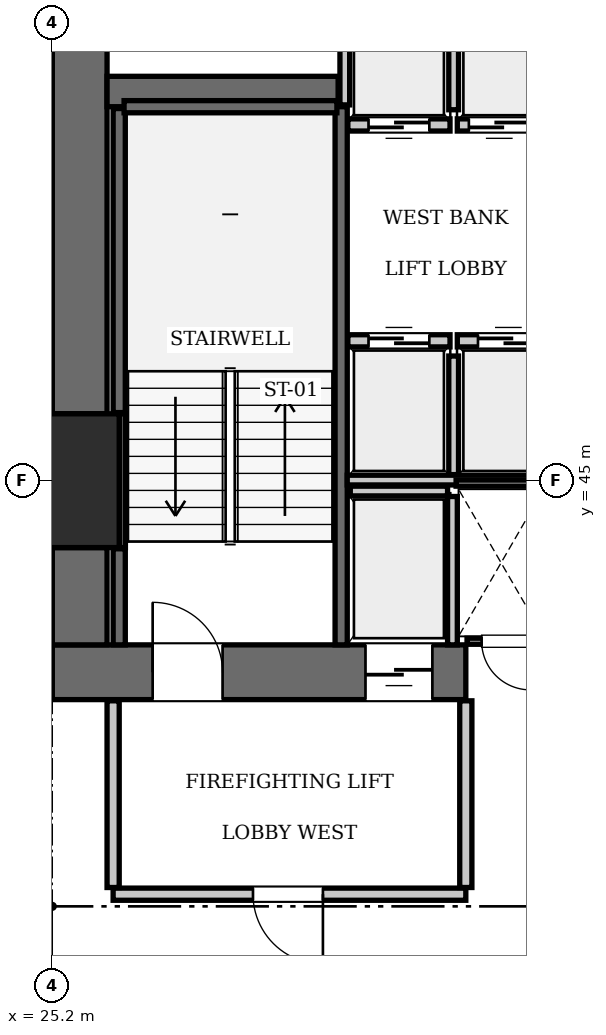
"""IFC4 building model, lengths in metres.
Left out: names, types, materials, properties, quantities, classifications, styles, units other than length and angle.
Written with IfcOpenShell. Run it as: python <this file> out.ifc"""

import sys

from ifc_helpers import new_model, si_unit, direction, frame, frame_2d, origin, origin_2d, place, context, subcontext, project, spatial, rectangle, extrude, element, fill, save


model = new_model("IFC4")
c1 = context("Model", 3, precision=1e-05, world=origin(), true_north=direction((0.0, 1.0)))
c2 = subcontext(c1, "Body", "Model", "MODEL_VIEW")
j1 = project(units=[si_unit("LENGTHUNIT", "METRE"), si_unit("PLANEANGLEUNIT", "RADIAN")], contexts=[c1])
p1 = place(None, origin())
s1 = spatial("IfcSite", under=j1, at=p1, CompositionType="ELEMENT")
p2 = place(p1, origin())
s2 = spatial("IfcBuilding", under=s1, at=p2, CompositionType="ELEMENT")
p3 = place(p2, frame((0.0, 0.0, 100.1)))
s3 = spatial("IfcBuildingStorey", under=s2, at=p3, CompositionType="ELEMENT", Elevation=100.1)
p4 = place(p3, frame((25.2, 45.0, 0.0), z_axis=(0.0, 0.0, 1.0), x_axis=(1.0, 0.0, 0.0)))
e1 = element("IfcColumn", 1, at=p4, inside=s3, PredefinedType="COLUMN", context=c2, shape_type="SweptSolid", body=[
    extrude(rectangle(XDim=2.2, YDim=2.2, at=origin_2d()), origin(), (0.0, 0.0, 1.0), 3.85),
])
p5 = place(p3, frame((25.2, 41.85, 0.0), z_axis=(0.0, 0.0, 1.0), x_axis=(1.0, 0.0, 0.0)))
e2 = element("IfcWall", 2, at=p5, inside=s3, PredefinedType="SHEAR", context=c2, shape_type="SweptSolid", body=[
    extrude(rectangle(XDim=6.8, YDim=0.9, at=frame_2d((3.4, 0.0))), origin(), (0.0, 0.0, 1.0), 3.85),
])
p6 = place(p5, frame((1.65, 0.0, 0.0)))
e3 = element("IfcOpeningElement", 3, at=p6, cuts=e2, PredefinedType="OPENING", context=c2, shape_type="SweptSolid", body=[
    extrude(rectangle(XDim=1.15, YDim=2.15, at=frame_2d((0.575, 1.075))), frame((0.0, 0.46, 0.0), z_axis=(0.0, -1.0, 0.0), x_axis=(1.0, 0.0, 0.0)), (0.0, 0.0, 1.0), 0.92),
])
p7 = place(p5, frame((5.15, 0.0, 0.0)))
e4 = element("IfcOpeningElement", 4, at=p7, cuts=e2, PredefinedType="OPENING", context=c2, shape_type="SweptSolid", body=[
    extrude(rectangle(XDim=1.1, YDim=2.2, at=frame_2d((0.55, 1.1))), frame((0.0, 0.46, 0.0), z_axis=(0.0, -1.0, 0.0), x_axis=(1.0, 0.0, 0.0)), (0.0, 0.0, 1.0), 0.92),
])
p8 = place(p3, frame((25.65, 42.3, 0.0), z_axis=(0.0, 0.0, 1.0), x_axis=(0.0, 1.0, 0.0)))
e5 = element("IfcWall", 5, at=p8, inside=s3, PredefinedType="SHEAR", context=c2, shape_type="SweptSolid", body=[
    extrude(rectangle(XDim=1.6, YDim=0.9, at=frame_2d((0.8, 0.0))), origin(), (0.0, 0.0, 1.0), 3.85),
])
p9 = place(p3, frame((25.65, 46.1, 0.0), z_axis=(0.0, 0.0, 1.0), x_axis=(0.0, 1.0, 0.0)))
e6 = element("IfcWall", 6, at=p9, inside=s3, PredefinedType="SHEAR", context=c2, shape_type="SweptSolid", body=[
    extrude(rectangle(XDim=7.0, YDim=0.9, at=frame_2d((3.5, 0.0))), origin(), (0.0, 0.0, 1.0), 3.85),
])
p10 = place(p3, frame((26.1, 51.4, 0.0), z_axis=(0.0, 0.0, 1.0), x_axis=(1.0, 0.0, 0.0)))
e7 = element("IfcWall", 7, at=p10, inside=s3, PredefinedType="SHEAR", context=c2, shape_type="SweptSolid", body=[
    extrude(rectangle(XDim=3.8, YDim=0.5, at=frame_2d((1.9, 0.0))), origin(), (0.0, 0.0, 1.0), 3.85),
])
p11 = place(p3, frame((29.95, 42.3, 0.0), z_axis=(0.0, 0.0, 1.0), x_axis=(0.0, 1.0, 0.0)))
e8 = element("IfcWall", 8, at=p11, inside=s3, PredefinedType="SOLIDWALL", context=c2, shape_type="SweptSolid", body=[
    extrude(rectangle(XDim=8.85, YDim=0.2, at=frame_2d((4.425, 0.0))), origin(), (0.0, 0.0, 1.0), 3.61),
])
p12 = place(p3, frame((26.3, 42.3, 0.0), z_axis=(0.0, 0.0, 1.0), x_axis=(0.0, 1.0, 0.0)))
e9 = element("IfcWall", 9, at=p12, inside=s3, PredefinedType="SOLIDWALL", context=c2, shape_type="SweptSolid", body=[
    extrude(rectangle(XDim=1.58, YDim=0.2, at=frame_2d((0.79, 0.0))), origin(), (0.0, 0.0, 1.0), 3.61),
])
p13 = place(p3, frame((26.3, 46.12, 0.0), z_axis=(0.0, 0.0, 1.0), x_axis=(0.0, 1.0, 0.0)))
e10 = element("IfcWall", 10, at=p13, inside=s3, PredefinedType="SOLIDWALL", context=c2, shape_type="SweptSolid", body=[
    extrude(rectangle(XDim=5.0, YDim=0.2, at=frame_2d((2.5, 0.0))), origin(), (0.0, 0.0, 1.0), 3.61),
])
p14 = place(p3, frame((26.38, 51.15, 0.0), z_axis=(0.0, 0.0, 1.0), x_axis=(1.0, 0.0, 0.0)))
e11 = element("IfcWall", 11, at=p14, inside=s3, PredefinedType="SOLIDWALL", context=c2, shape_type="SweptSolid", body=[
    extrude(rectangle(XDim=3.5, YDim=0.2, at=frame_2d((1.75, 0.0))), origin(), (0.0, 0.0, 1.0), 3.61),
])
p15 = place(p3, frame((26.352, 43.9, 0.0), z_axis=(0.0, 0.0, 1.0), x_axis=(0.0, 1.0, 0.0)))
e12 = element("IfcWall", 12, at=p15, inside=s3, PredefinedType="SOLIDWALL", context=c2, shape_type="SweptSolid", body=[
    extrude(rectangle(XDim=2.2, YDim=0.1, at=frame_2d((1.1, 0.0))), origin(), (0.0, 0.0, 1.0), 3.61),
])
p16 = place(p3, frame((30.06, 47.3, 0.0), z_axis=(0.0, 0.0, 1.0), x_axis=(1.0, 0.0, 0.0)))
e13 = element("IfcWall", 13, at=p16, inside=s3, PredefinedType="SOLIDWALL", context=c2, shape_type="SweptSolid", body=[
    extrude(rectangle(XDim=1.68, YDim=0.2, at=frame_2d((0.84, 0.0))), origin(), (0.0, 0.0, 1.0), 3.61),
])
p17 = place(p16, frame((0.34, 0.0, 0.0)))
e14 = element("IfcOpeningElement", 14, at=p17, cuts=e13, PredefinedType="OPENING", context=c2, shape_type="SweptSolid", body=[
    extrude(rectangle(XDim=1.0, YDim=2.15, at=frame_2d((0.5, 1.075))), frame((0.0, 0.11, 0.0), z_axis=(0.0, -1.0, 0.0), x_axis=(1.0, 0.0, 0.0)), (0.0, 0.0, 1.0), 0.22),
])
p18 = place(p3, frame((31.86, 47.3, 0.0), z_axis=(0.0, 0.0, 1.0), x_axis=(1.0, 0.0, 0.0)))
e15 = element("IfcWall", 15, at=p18, inside=s3, PredefinedType="SOLIDWALL", context=c2, shape_type="SweptSolid", body=[
    extrude(rectangle(XDim=1.68, YDim=0.2, at=frame_2d((0.84, 0.0))), origin(), (0.0, 0.0, 1.0), 3.61),
])
p19 = place(p18, frame((0.34, 0.0, 0.0)))
e16 = element("IfcOpeningElement", 16, at=p19, cuts=e15, PredefinedType="OPENING", context=c2, shape_type="SweptSolid", body=[
    extrude(rectangle(XDim=1.0, YDim=2.15, at=frame_2d((0.5, 1.075))), frame((0.0, 0.11, 0.0), z_axis=(0.0, -1.0, 0.0), x_axis=(1.0, 0.0, 0.0)), (0.0, 0.0, 1.0), 0.22),
])
p20 = place(p3, frame((30.06, 50.85, 0.0), z_axis=(0.0, 0.0, 1.0), x_axis=(1.0, 0.0, 0.0)))
e17 = element("IfcWall", 17, at=p20, inside=s3, PredefinedType="SOLIDWALL", context=c2, shape_type="SweptSolid", body=[
    extrude(rectangle(XDim=1.68, YDim=0.2, at=frame_2d((0.84, 0.0))), origin(), (0.0, 0.0, 1.0), 3.61),
])
p21 = place(p20, frame((0.34, 0.0, 0.0)))
e18 = element("IfcOpeningElement", 18, at=p21, cuts=e17, PredefinedType="OPENING", context=c2, shape_type="SweptSolid", body=[
    extrude(rectangle(XDim=1.0, YDim=2.15, at=frame_2d((0.5, 1.075))), frame((0.0, 0.11, 0.0), z_axis=(0.0, -1.0, 0.0), x_axis=(1.0, 0.0, 0.0)), (0.0, 0.0, 1.0), 0.22),
])
p22 = place(p3, frame((31.86, 50.85, 0.0), z_axis=(0.0, 0.0, 1.0), x_axis=(1.0, 0.0, 0.0)))
e19 = element("IfcWall", 19, at=p22, inside=s3, PredefinedType="SOLIDWALL", context=c2, shape_type="SweptSolid", body=[
    extrude(rectangle(XDim=1.38, YDim=0.2, at=frame_2d((0.69, 0.0))), origin(), (0.0, 0.0, 1.0), 3.61),
])
p23 = place(p22, frame((0.19, 0.0, 0.0)))
e20 = element("IfcOpeningElement", 20, at=p23, cuts=e19, PredefinedType="OPENING", context=c2, shape_type="SweptSolid", body=[
    extrude(rectangle(XDim=1.0, YDim=2.15, at=frame_2d((0.5, 1.075))), frame((0.0, 0.11, 0.0), z_axis=(0.0, -1.0, 0.0), x_axis=(1.0, 0.0, 0.0)), (0.0, 0.0, 1.0), 0.22),
])
p24 = place(p3, frame((30.1, 44.83, 0.0), z_axis=(0.0, 0.0, 1.0), x_axis=(1.0, 0.0, 0.0)))
e21 = element("IfcWall", 21, at=p24, inside=s3, PredefinedType="SOLIDWALL", context=c2, shape_type="SweptSolid", body=[
    extrude(rectangle(XDim=1.6, YDim=0.16, at=frame_2d((0.8, 0.0))), origin(), (0.0, 0.0, 1.0), 3.61),
])
p25 = place(p3, frame((31.78, 42.3, 0.0), z_axis=(0.0, 0.0, 1.0), x_axis=(0.0, 1.0, 0.0)))
e22 = element("IfcWall", 22, at=p25, inside=s3, PredefinedType="SOLIDWALL", context=c2, shape_type="SweptSolid", body=[
    extrude(rectangle(XDim=2.44, YDim=0.16, at=frame_2d((1.22, 0.0))), origin(), (0.0, 0.0, 1.0), 3.61),
])
p26 = place(p3, frame((31.8, 45.1, 0.0), z_axis=(0.0, 0.0, 1.0), x_axis=(0.0, 1.0, 0.0)))
e23 = element("IfcWall", 23, at=p26, inside=s3, PredefinedType="SOLIDWALL", context=c2, shape_type="SweptSolid", body=[
    extrude(rectangle(XDim=1.95, YDim=0.16, at=frame_2d((0.975, 0.0))), origin(), (0.0, 0.0, 1.0), 3.61),
])
p27 = place(p3, frame((30.05, 45.01, 0.0), z_axis=(0.0, 0.0, 1.0), x_axis=(1.0, 0.0, 0.0)))
e24 = element("IfcWall", 24, at=p27, inside=s3, PredefinedType="SOLIDWALL", context=c2, shape_type="SweptSolid", body=[
    extrude(rectangle(XDim=3.45, YDim=0.16, at=frame_2d((1.725, 0.0))), origin(), (0.0, 0.0, 1.0), 3.61),
])
p28 = place(p3, frame((30.01, 51.18, 0.0), z_axis=(0.0, 0.0, 1.0), x_axis=(0.0, 1.0, 0.0)))
e25 = element("IfcWall", 25, at=p28, inside=s3, PredefinedType="SOLIDWALL", context=c2, shape_type="SweptSolid", body=[
    extrude(rectangle(XDim=1.92, YDim=0.16, at=frame_2d((0.96, 0.0))), origin(), (0.0, 0.0, 1.0), 3.61),
])
p29 = place(p3, frame((31.8, 51.1, 0.0), z_axis=(0.0, 0.0, 1.0), x_axis=(0.0, 1.0, 0.0)))
e26 = element("IfcWall", 26, at=p29, inside=s3, PredefinedType="SOLIDWALL", context=c2, shape_type="SweptSolid", body=[
    extrude(rectangle(XDim=2.0, YDim=0.16, at=frame_2d((1.0, 0.0))), origin(), (0.0, 0.0, 1.0), 3.61),
])
p30 = place(p3, frame((26.2, 38.2, 0.0), z_axis=(0.0, 0.0, 1.0), x_axis=(1.0, 0.0, 0.0)))
e27 = element("IfcWall", 27, at=p30, inside=s3, PredefinedType="PARTITIONING", context=c2, shape_type="SweptSolid", body=[
    extrude(rectangle(XDim=5.8, YDim=0.2, at=frame_2d((2.9, 0.0))), origin(), (0.0, 0.0, 1.0), 3.61),
])
p31 = place(p30, frame((2.3, 0.0, 0.0)))
e28 = element("IfcOpeningElement", 28, at=p31, cuts=e27, PredefinedType="OPENING", context=c2, shape_type="SweptSolid", body=[
    extrude(rectangle(XDim=1.15, YDim=2.15, at=frame_2d((0.575, 1.075))), frame((0.0, 0.11, 0.0), z_axis=(0.0, -1.0, 0.0), x_axis=(1.0, 0.0, 0.0)), (0.0, 0.0, 1.0), 0.22),
])
for number, where, z_axis, x_axis in (
    (29, (26.2, 38.31, 0.0), (0.0, 0.0, 1.0), (0.0, 1.0, 0.0)),
    (30, (32.0, 38.31, 0.0), (0.0, 0.0, 1.0), (0.0, 1.0, 0.0)),
):
    element("IfcWall", number, at=place(p3, frame(where, z_axis=z_axis, x_axis=x_axis)), inside=s3, PredefinedType="PARTITIONING", context=c2, shape_type="SweptSolid", body=[
        extrude(rectangle(XDim=3.07, YDim=0.2, at=frame_2d((1.535, 0.0))), origin(), (0.0, 0.0, 1.0), 3.61),
    ])
p32 = place(p3, frame((32.02, 42.36, 0.0), z_axis=(0.0, 0.0, 1.0), x_axis=(1.0, 0.0, 0.0)))
e31 = element("IfcWall", 31, at=p32, inside=s3, PredefinedType="PARTITIONING", context=c2, shape_type="SweptSolid", body=[
    extrude(rectangle(XDim=1.32, YDim=0.1, at=frame_2d((0.66, 0.0))), origin(), (0.0, 0.0, 1.0), 3.61),
])
p33 = place(p32, frame((0.24, 0.0, 0.0)))
e32 = element("IfcOpeningElement", 32, at=p33, cuts=e31, PredefinedType="OPENING", context=c2, shape_type="SweptSolid", body=[
    extrude(rectangle(XDim=0.8, YDim=2.05, at=frame_2d((0.4, 1.025))), frame((0.0, 0.06, 0.0), z_axis=(0.0, -1.0, 0.0), x_axis=(1.0, 0.0, 0.0)), (0.0, 0.0, 1.0), 0.12),
])
p34 = place(p3, frame((31.84, 44.96, 0.0), z_axis=(0.0, 0.0, 1.0), x_axis=(1.0, 0.0, 0.0)))
e33 = element("IfcWall", 33, at=p34, inside=s3, PredefinedType="PARTITIONING", context=c2, shape_type="SweptSolid", body=[
    extrude(rectangle(XDim=1.48, YDim=0.1, at=frame_2d((0.74, 0.0))), origin(), (0.0, 0.0, 1.0), 3.61),
])
p35 = place(p6, origin())
e34 = element("IfcDoor", 34, at=p35, inside=s3, OperationType="SINGLE_SWING_LEFT", PredefinedType="DOOR", context=c2, shape_type="SweptSolid", body=[
    extrude(rectangle(XDim=1.15, YDim=2.15, at=frame_2d((0.575, 1.075))), frame((0.0, 0.025, 0.0), z_axis=(0.0, -1.0, 0.0), x_axis=(1.0, 0.0, 0.0)), (0.0, 0.0, 1.0), 0.05),
])
fill(e3, e34)
p36 = place(p17, origin())
e35 = element("IfcDoor", 35, at=p36, inside=s3, OperationType="SLIDING_TO_LEFT", PredefinedType="DOOR", context=c2, shape_type="SweptSolid", body=[
    extrude(rectangle(XDim=1.0, YDim=2.15, at=frame_2d((0.5, 1.075))), frame((0.0, 0.025, 0.0), z_axis=(0.0, -1.0, 0.0), x_axis=(1.0, 0.0, 0.0)), (0.0, 0.0, 1.0), 0.05),
])
fill(e14, e35)
p37 = place(p19, origin())
e36 = element("IfcDoor", 36, at=p37, inside=s3, OperationType="SLIDING_TO_LEFT", PredefinedType="DOOR", context=c2, shape_type="SweptSolid", body=[
    extrude(rectangle(XDim=1.0, YDim=2.15, at=frame_2d((0.5, 1.075))), frame((0.0, 0.025, 0.0), z_axis=(0.0, -1.0, 0.0), x_axis=(1.0, 0.0, 0.0)), (0.0, 0.0, 1.0), 0.05),
])
fill(e16, e36)
p38 = place(p21, frame((1.0, 0.0, 0.0), z_axis=(0.0, 0.0, 1.0), x_axis=(-1.0, 0.0, 0.0)))
e37 = element("IfcDoor", 37, at=p38, inside=s3, OperationType="SLIDING_TO_LEFT", PredefinedType="DOOR", context=c2, shape_type="SweptSolid", body=[
    extrude(rectangle(XDim=1.0, YDim=2.15, at=frame_2d((0.5, 1.075))), frame((0.0, 0.025, 0.0), z_axis=(0.0, -1.0, 0.0), x_axis=(1.0, 0.0, 0.0)), (0.0, 0.0, 1.0), 0.05),
])
fill(e18, e37)
p39 = place(p23, frame((1.0, 0.0, 0.0), z_axis=(0.0, 0.0, 1.0), x_axis=(-1.0, 0.0, 0.0)))
e38 = element("IfcDoor", 38, at=p39, inside=s3, OperationType="SLIDING_TO_LEFT", PredefinedType="DOOR", context=c2, shape_type="SweptSolid", body=[
    extrude(rectangle(XDim=1.0, YDim=2.15, at=frame_2d((0.5, 1.075))), frame((0.0, 0.025, 0.0), z_axis=(0.0, -1.0, 0.0), x_axis=(1.0, 0.0, 0.0)), (0.0, 0.0, 1.0), 0.05),
])
fill(e20, e38)
p40 = place(p7, frame((1.1, 0.0, 0.0), z_axis=(0.0, 0.0, 1.0), x_axis=(-1.0, 0.0, 0.0)))
e39 = element("IfcDoor", 39, at=p40, inside=s3, OperationType="SLIDING_TO_LEFT", PredefinedType="DOOR", context=c2, shape_type="SweptSolid", body=[
    extrude(rectangle(XDim=1.1, YDim=2.2, at=frame_2d((0.55, 1.1))), frame((0.0, 0.025, 0.0), z_axis=(0.0, -1.0, 0.0), x_axis=(1.0, 0.0, 0.0)), (0.0, 0.0, 1.0), 0.05),
])
fill(e4, e39)
p41 = place(p31, frame((1.15, 0.0, 0.0), z_axis=(0.0, 0.0, 1.0), x_axis=(-1.0, 0.0, 0.0)))
e40 = element("IfcDoor", 40, at=p41, inside=s3, OperationType="SINGLE_SWING_LEFT", PredefinedType="DOOR", context=c2, shape_type="SweptSolid", body=[
    extrude(rectangle(XDim=1.15, YDim=2.15, at=frame_2d((0.575, 1.075))), frame((0.0, 0.025, 0.0), z_axis=(0.0, -1.0, 0.0), x_axis=(1.0, 0.0, 0.0)), (0.0, 0.0, 1.0), 0.05),
])
fill(e28, e40)
p42 = place(p33, frame((0.8, 0.0, 0.0), z_axis=(0.0, 0.0, 1.0), x_axis=(-1.0, 0.0, 0.0)))
e41 = element("IfcDoor", 41, at=p42, inside=s3, OperationType="SINGLE_SWING_LEFT", PredefinedType="DOOR", context=c2, shape_type="SweptSolid", body=[
    extrude(rectangle(XDim=0.8, YDim=2.05, at=frame_2d((0.4, 1.025))), frame((0.0, 0.025, 0.0), z_axis=(0.0, -1.0, 0.0), x_axis=(1.0, 0.0, 0.0)), (0.0, 0.0, 1.0), 0.05),
])
fill(e32, e41)
save(model, sys.argv[1])
